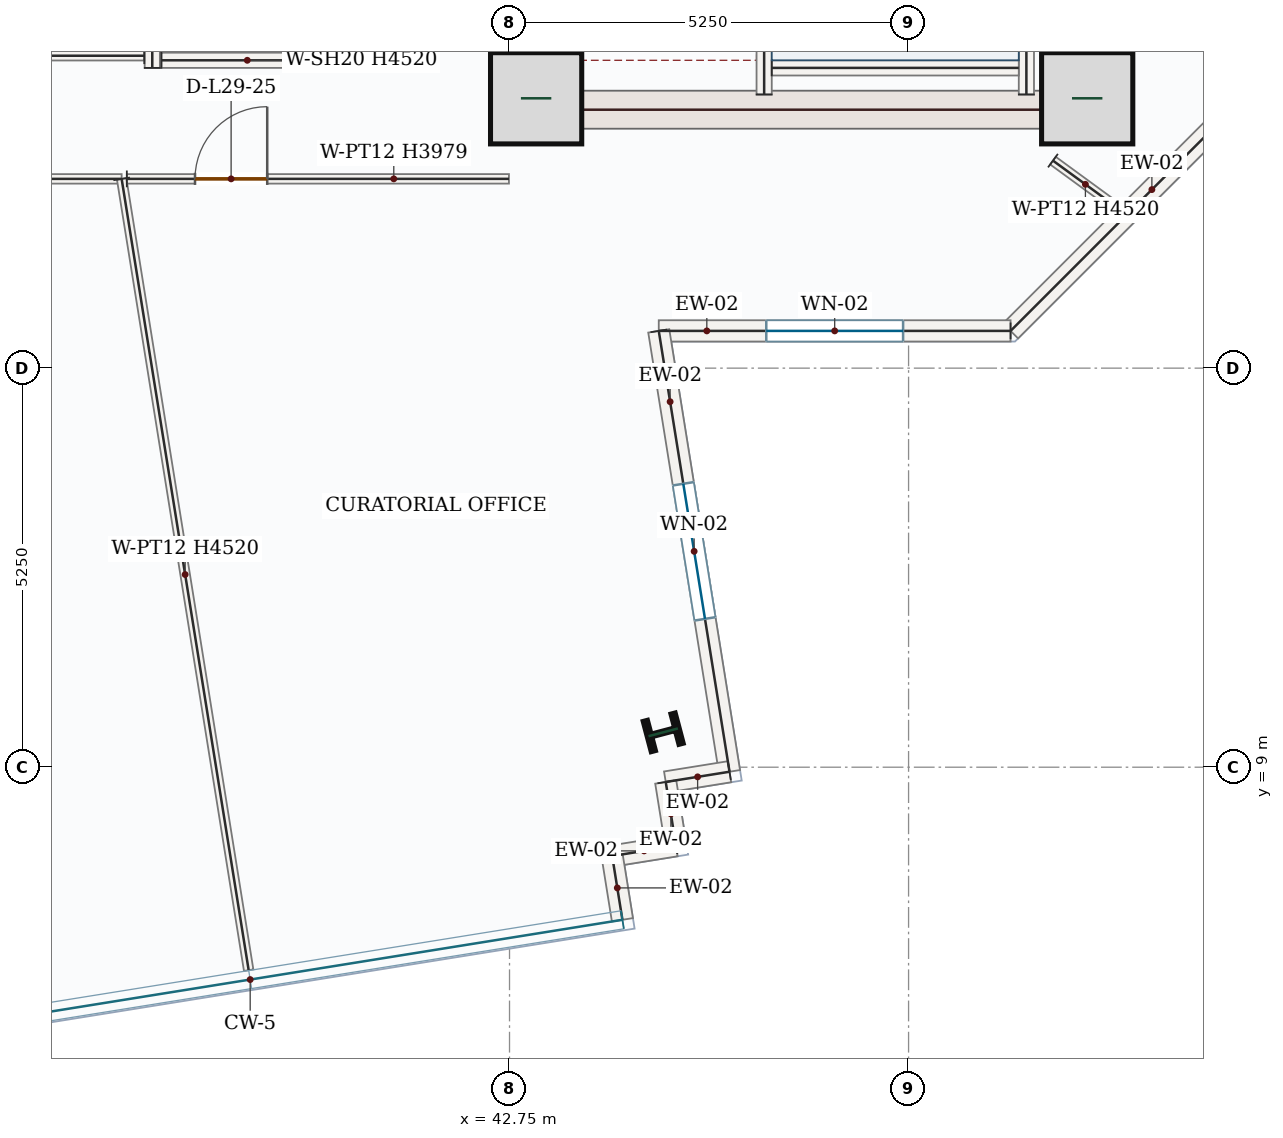
"""IFC4 building model, lengths in metres.
Left out: names, types, materials, properties, quantities, classifications, styles, units other than length and angle.
Written with IfcOpenShell. Run it as: python <this file> out.ifc"""

import sys

from ifc_helpers import new_model, si_unit, direction, frame, frame_2d, origin, origin_2d, place, context, subcontext, project, spatial, rectangle, i_section, extrude, source, transform, mapped, element, fill, save


model = new_model("IFC4")
c1 = context("Model", 3, precision=1e-05, world=origin(), true_north=direction((0.0, 1.0)))
c2 = subcontext(c1, "Body", "Model", "MODEL_VIEW")
j1 = project(units=[si_unit("LENGTHUNIT", "METRE"), si_unit("PLANEANGLEUNIT", "RADIAN")], contexts=[c1])
p1 = place(None, origin())
s1 = spatial("IfcSite", under=j1, at=p1, CompositionType="ELEMENT")
p2 = place(p1, origin())
s2 = spatial("IfcBuilding", under=s1, at=p2, CompositionType="ELEMENT")
p3 = place(p2, frame((0.0, 0.0, 130.8)))
s3 = spatial("IfcBuildingStorey", under=s2, at=p3, CompositionType="ELEMENT", Elevation=130.8)
p4 = place(p3, frame((43.0, 17.4, 0.0), z_axis=(0.0, 0.0, 1.0), x_axis=(0.0, 1.0, 0.0)))
e1 = element("IfcWall", 1, at=p4, inside=s3, PredefinedType="SHEAR", context=c2, shape_type="SweptSolid", body=[
    extrude(rectangle(XDim=8.55, YDim=0.5, at=frame_2d((4.275, 0.0))), origin(), (0.0, 0.0, 1.0), 4.52),
])
p5 = place(p4, frame((6.65, 0.0, 0.0)))
e2 = element("IfcOpeningElement", 2, at=p5, cuts=e1, PredefinedType="OPENING", context=c2, shape_type="SweptSolid", body=[
    extrude(rectangle(XDim=1.1, YDim=2.2, at=frame_2d((0.55, 1.1))), frame((0.0, 0.26, 0.0), z_axis=(0.0, -1.0, 0.0), x_axis=(1.0, 0.0, 0.0)), (0.0, 0.0, 1.0), 0.52),
])
p6 = place(p4, frame((1.75, 0.0, 0.0)))
e3 = element("IfcOpeningElement", 3, at=p6, cuts=e1, PredefinedType="OPENING", context=c2, shape_type="SweptSolid", body=[
    extrude(rectangle(XDim=1.3, YDim=2.2, at=frame_2d((0.65, 1.1))), frame((0.0, 0.26, 0.0), z_axis=(0.0, -1.0, 0.0), x_axis=(1.0, 0.0, 0.0)), (0.0, 0.0, 1.0), 0.52),
])
p7 = place(p4, frame((4.3, 0.0, 0.0)))
e4 = element("IfcOpeningElement", 4, at=p7, cuts=e1, PredefinedType="OPENING", context=c2, shape_type="SweptSolid", body=[
    extrude(rectangle(XDim=0.88, YDim=2.1, at=frame_2d((0.44, 1.05))), frame((0.0, 0.26, 0.0), z_axis=(0.0, -1.0, 0.0), x_axis=(1.0, 0.0, 0.0)), (0.0, 0.0, 1.0), 0.52),
])
m1 = source(origin(), c2, "Body", "SweptSolid", [
    extrude(rectangle(XDim=8.55, YDim=0.5, at=frame_2d((4.275, 0.0))), origin(), (0.0, 0.0, 1.0), 4.52),
])
p8 = place(p3, frame((50.5, 17.4, 0.0), z_axis=(0.0, 0.0, 1.0), x_axis=(0.0, 1.0, 0.0)))
e5 = element("IfcWall", 5, at=p8, inside=s3, PredefinedType="SHEAR", context=c2, shape_type="MappedRepresentation", body=[
    mapped(m1, transform((0.0, 0.0, 0.0), x_axis=(1.0, 0.0, 0.0), y_axis=(0.0, 1.0, 0.0), z_axis=(0.0, 0.0, 1.0), scale=1.0)),
])
m2 = source(origin(), c2, "Body", "SweptSolid", [
    extrude(rectangle(XDim=7.0, YDim=0.5, at=frame_2d((3.5, 0.0))), origin(), (0.0, 0.0, 1.0), 4.52),
])
p9 = place(p3, frame((43.25, 17.65, 0.0), z_axis=(0.0, 0.0, 1.0), x_axis=(1.0, 0.0, 0.0)))
e6 = element("IfcWall", 6, at=p9, inside=s3, PredefinedType="SHEAR", context=c2, shape_type="MappedRepresentation", body=[
    mapped(m2, transform((0.0, 0.0, 0.0), x_axis=(1.0, 0.0, 0.0), y_axis=(0.0, 1.0, 0.0), z_axis=(0.0, 0.0, 1.0), scale=1.0)),
])
m3 = source(origin(), c2, "Body", "SweptSolid", [
    extrude(rectangle(XDim=1.2, YDim=1.2, at=origin_2d()), origin(), (0.0, 0.0, 1.0), 4.8),
])
for number, where, z_axis, x_axis in (
    (7, (43.1, 17.8, 0.0), (0.0, 0.0, 1.0), (1.0, 0.0, 0.0)),
    (8, (50.35, 17.8, 0.0), (0.0, 0.0, 1.0), (1.0, 0.0, 0.0)),
):
    element("IfcColumn", number, at=place(p3, frame(where, z_axis=z_axis, x_axis=x_axis)), inside=s3, PredefinedType="COLUMN", context=c2, shape_type="MappedRepresentation", body=[
        mapped(m3, transform((0.0, 0.0, 0.0), x_axis=(1.0, 0.0, 0.0), y_axis=(0.0, 1.0, 0.0), z_axis=(0.0, 0.0, 1.0), scale=1.0)),
    ])
m4 = source(origin(), c2, "Body", "SweptSolid", [
    extrude(i_section(OverallWidth=0.412, OverallDepth=0.435, WebThickness=0.036, FlangeThickness=0.057, FilletRadius=0.018, at=origin_2d()), origin(), (0.0, 0.0, 1.0), 4.8),
])
p10 = place(p3, frame((44.772, 9.459, 0.0), z_axis=(0.0, 0.0, 1.0), x_axis=(-0.255445757936, 0.966823388604, 0.0)))
e9 = element("IfcColumn", 9, at=p10, inside=s3, PredefinedType="COLUMN", context=c2, shape_type="MappedRepresentation", body=[
    mapped(m4, transform((0.0, 0.0, 0.0), x_axis=(1.0, 0.0, 0.0), y_axis=(0.0, 1.0, 0.0), z_axis=(0.0, 0.0, 1.0), scale=1.0)),
])
m5 = source(origin(), c2, "Body", "SweptSolid", [
    extrude(rectangle(XDim=5.258, YDim=0.28, at=frame_2d((2.629, 0.0))), origin(), (0.0, 0.0, 1.0), 4.52),
])
p11 = place(p3, frame((53.06, 18.458, 0.0), z_axis=(0.0, 0.0, 1.0), x_axis=(-0.707106781187, -0.707106781187, 0.0)))
e10 = element("IfcWall", 10, at=p11, inside=s3, PredefinedType="SOLIDWALL", context=c2, shape_type="MappedRepresentation", body=[
    mapped(m5, transform((0.0, 0.0, 0.0), x_axis=(1.0, 0.0, 0.0), y_axis=(0.0, 1.0, 0.0), z_axis=(0.0, 0.0, 1.0), scale=1.0)),
])
p12 = place(p3, frame((49.342, 14.74, 0.0), z_axis=(0.0, 0.0, 1.0), x_axis=(-1.0, 0.0, 0.0)))
e11 = element("IfcWall", 11, at=p12, inside=s3, PredefinedType="SOLIDWALL", context=c2, shape_type="SweptSolid", body=[
    extrude(rectangle(XDim=4.629, YDim=0.28, at=frame_2d((2.314, 0.0))), origin(), (0.0, 0.0, 1.0), 4.52),
])
p13 = place(p12, frame((1.414, 0.0, 0.85)))
e12 = element("IfcOpeningElement", 12, at=p13, cuts=e11, PredefinedType="OPENING", context=c2, shape_type="SweptSolid", body=[
    extrude(rectangle(XDim=1.8, YDim=1.75, at=frame_2d((0.9, 0.875))), frame((0.0, 0.15, 0.0), z_axis=(0.0, -1.0, 0.0), x_axis=(1.0, 0.0, 0.0)), (0.0, 0.0, 1.0), 0.3),
])
p14 = place(p3, frame((44.713, 14.74, 0.0), z_axis=(0.0, 0.0, 1.0), x_axis=(0.158478405349, -0.987362443603, 0.0)))
e13 = element("IfcWall", 13, at=p14, inside=s3, PredefinedType="SOLIDWALL", context=c2, shape_type="SweptSolid", body=[
    extrude(rectangle(XDim=5.874, YDim=0.28, at=frame_2d((2.937, 0.0))), origin(), (0.0, 0.0, 1.0), 4.52),
])
p15 = place(p14, frame((2.037, 0.0, 0.85)))
e14 = element("IfcOpeningElement", 14, at=p15, cuts=e13, PredefinedType="OPENING", context=c2, shape_type="SweptSolid", body=[
    extrude(rectangle(XDim=1.8, YDim=1.75, at=frame_2d((0.9, 0.875))), frame((0.0, 0.15, 0.0), z_axis=(0.0, -1.0, 0.0), x_axis=(1.0, 0.0, 0.0)), (0.0, 0.0, 1.0), 0.3),
])
m6 = source(origin(), c2, "Body", "SweptSolid", [
    extrude(rectangle(XDim=0.85, YDim=0.28, at=frame_2d((0.425, 0.0))), origin(), (0.0, 0.0, 1.0), 4.52),
])
p16 = place(p3, frame((45.644, 8.94, 0.0), z_axis=(0.0, 0.0, 1.0), x_axis=(-0.987392182174, -0.158293014948, 0.0)))
e15 = element("IfcWall", 15, at=p16, inside=s3, PredefinedType="SOLIDWALL", context=c2, shape_type="MappedRepresentation", body=[
    mapped(m6, transform((0.0, 0.0, 0.0), x_axis=(1.0, 0.0, 0.0), y_axis=(0.0, 1.0, 0.0), z_axis=(0.0, 0.0, 1.0), scale=1.0)),
])
m7 = source(origin(), c2, "Body", "SweptSolid", [
    extrude(rectangle(XDim=0.85, YDim=0.28, at=frame_2d((0.425, 0.0))), origin(), (0.0, 0.0, 1.0), 4.52),
])
for number, where, z_axis, x_axis in (
    (16, (44.805, 8.806, 0.0), (0.0, 0.0, 1.0), (0.159, -0.987, 0.0)),
    (17, (44.94, 7.966, 0.0), (0.0, 0.0, 1.0), (-0.987, -0.159, 0.0)),
):
    element("IfcWall", number, at=place(p3, frame(where, z_axis=z_axis, x_axis=x_axis)), inside=s3, PredefinedType="SOLIDWALL", context=c2, shape_type="MappedRepresentation", body=[
        mapped(m7, transform((0.0, 0.0, 0.0), x_axis=(1.0, 0.0, 0.0), y_axis=(0.0, 1.0, 0.0), z_axis=(0.0, 0.0, 1.0), scale=1.0)),
    ])
p17 = place(p3, frame((44.101, 7.832, 0.0), z_axis=(0.0, 0.0, 1.0), x_axis=(0.15857308062, -0.98734724292, 0.0)))
e18 = element("IfcWall", 18, at=p17, inside=s3, PredefinedType="SOLIDWALL", context=c2, shape_type="MappedRepresentation", body=[
    mapped(m6, transform((0.0, 0.0, 0.0), x_axis=(1.0, 0.0, 0.0), y_axis=(0.0, 1.0, 0.0), z_axis=(0.0, 0.0, 1.0), scale=1.0)),
])
m8 = source(origin(), c2, "Body", "SweptSolid", [
    extrude(rectangle(XDim=7.87, YDim=0.2, at=frame_2d((3.935, 0.0))), origin(), (0.0, 0.0, 1.0), 4.52),
])
p18 = place(p3, frame((49.55, 17.85, 0.0), z_axis=(0.0, 0.0, 1.0), x_axis=(0.0, 1.0, 0.0)))
e19 = element("IfcWall", 19, at=p18, inside=s3, PredefinedType="SOLIDWALL", context=c2, shape_type="MappedRepresentation", body=[
    mapped(m8, transform((0.0, 0.0, 0.0), x_axis=(1.0, 0.0, 0.0), y_axis=(0.0, 1.0, 0.0), z_axis=(0.0, 0.0, 1.0), scale=1.0)),
])
p19 = place(p3, frame((46.1, 17.85, 0.0), z_axis=(0.0, 0.0, 1.0), x_axis=(0.0, 1.0, 0.0)))
e20 = element("IfcWall", 20, at=p19, inside=s3, PredefinedType="SOLIDWALL", context=c2, shape_type="SweptSolid", body=[
    extrude(rectangle(XDim=8.0, YDim=0.2, at=frame_2d((4.0, 0.0))), origin(), (0.0, 0.0, 1.0), 4.52),
])
p20 = place(p19, frame((6.3, 0.0, 0.0)))
e21 = element("IfcOpeningElement", 21, at=p20, cuts=e20, PredefinedType="OPENING", context=c2, shape_type="SweptSolid", body=[
    extrude(rectangle(XDim=1.05, YDim=2.15, at=frame_2d((0.525, 1.075))), frame((0.0, 0.11, 0.0), z_axis=(0.0, -1.0, 0.0), x_axis=(1.0, 0.0, 0.0)), (0.0, 0.0, 1.0), 0.22),
])
m9 = source(origin(), c2, "Body", "SweptSolid", [
    extrude(rectangle(XDim=3.25, YDim=0.2, at=frame_2d((1.625, 0.0))), origin(), (0.0, 0.0, 1.0), 4.52),
])
p21 = place(p3, frame((46.2, 18.2, 0.0), z_axis=(0.0, 0.0, 1.0), x_axis=(1.0, 0.0, 0.0)))
e22 = element("IfcWall", 22, at=p21, inside=s3, PredefinedType="SOLIDWALL", context=c2, shape_type="MappedRepresentation", body=[
    mapped(m9, transform((0.0, 0.0, 0.0), x_axis=(1.0, 0.0, 0.0), y_axis=(0.0, 1.0, 0.0), z_axis=(0.0, 0.0, 1.0), scale=1.0)),
])
m10 = source(origin(), c2, "Body", "SweptSolid", [
    extrude(rectangle(XDim=2.35, YDim=0.2, at=frame_2d((1.175, 0.0))), origin(), (0.0, 0.0, 1.0), 4.52),
])
p22 = place(p3, frame((38.05, 18.2, 0.0), z_axis=(0.0, 0.0, 1.0), x_axis=(0.0, 1.0, 0.0)))
e23 = element("IfcWall", 23, at=p22, inside=s3, PredefinedType="SOLIDWALL", context=c2, shape_type="MappedRepresentation", body=[
    mapped(m10, transform((0.0, 0.0, 0.0), x_axis=(1.0, 0.0, 0.0), y_axis=(0.0, 1.0, 0.0), z_axis=(0.0, 0.0, 1.0), scale=1.0)),
])
p23 = place(p3, frame((40.55, 18.2, 0.0), z_axis=(0.0, 0.0, 1.0), x_axis=(0.0, 1.0, 0.0)))
e24 = element("IfcWall", 24, at=p23, inside=s3, PredefinedType="SOLIDWALL", context=c2, shape_type="SweptSolid", body=[
    extrude(rectangle(XDim=2.35, YDim=0.2, at=frame_2d((1.175, 0.0))), origin(), (0.0, 0.0, 1.0), 4.52),
])
p24 = place(p23, frame((0.625, 0.0, 0.0)))
e25 = element("IfcOpeningElement", 25, at=p24, cuts=e24, PredefinedType="OPENING", context=c2, shape_type="SweptSolid", body=[
    extrude(rectangle(XDim=1.1, YDim=2.15, at=frame_2d((0.55, 1.075))), frame((0.0, 0.11, 0.0), z_axis=(0.0, -1.0, 0.0), x_axis=(1.0, 0.0, 0.0)), (0.0, 0.0, 1.0), 0.22),
])
m11 = source(origin(), c2, "Body", "SweptSolid", [
    extrude(rectangle(XDim=2.26, YDim=0.2, at=frame_2d((1.13, 0.0))), origin(), (0.0, 0.0, 1.0), 4.52),
])
p25 = place(p3, frame((38.17, 18.3, 0.0), z_axis=(0.0, 0.0, 1.0), x_axis=(1.0, 0.0, 0.0)))
e26 = element("IfcWall", 26, at=p25, inside=s3, PredefinedType="SOLIDWALL", context=c2, shape_type="MappedRepresentation", body=[
    mapped(m11, transform((0.0, 0.0, 0.0), x_axis=(1.0, 0.0, 0.0), y_axis=(0.0, 1.0, 0.0), z_axis=(0.0, 0.0, 1.0), scale=1.0)),
])
m12 = source(origin(), c2, "Body", "SweptSolid", [
    extrude(rectangle(XDim=3.89, YDim=0.125, at=frame_2d((1.945, 0.0))), origin(), (0.0, 0.0, 1.0), 4.52),
])
p26 = place(p3, frame((37.945, 18.36, 0.0), z_axis=(0.0, 0.0, 1.0), x_axis=(-1.0, 0.0, 0.0)))
e27 = element("IfcWall", 27, at=p26, inside=s3, PredefinedType="PARTITIONING", context=c2, shape_type="MappedRepresentation", body=[
    mapped(m12, transform((0.0, 0.0, 0.0), x_axis=(1.0, 0.0, 0.0), y_axis=(0.0, 1.0, 0.0), z_axis=(0.0, 0.0, 1.0), scale=1.0)),
])
p27 = place(p3, frame((29.258, 16.74, 0.0), z_axis=(0.0, 0.0, 1.0), x_axis=(0.999999999577, -2.9101068e-05, 0.0)))
e28 = element("IfcWall", 28, at=p27, inside=s3, PredefinedType="PARTITIONING", context=c2, shape_type="SweptSolid", body=[
    extrude(rectangle(XDim=8.389, YDim=0.125, at=frame_2d((4.195, 0.0))), origin(), (0.0, 0.0, 1.0), 4.52),
])
p28 = place(p27, frame((5.803, 0.0, 0.0)))
e29 = element("IfcOpeningElement", 29, at=p28, cuts=e28, PredefinedType="OPENING", context=c2, shape_type="SweptSolid", body=[
    extrude(rectangle(XDim=0.95, YDim=2.15, at=frame_2d((0.475, 1.075))), frame((0.0, 0.073, 0.0), z_axis=(0.0, -1.0, 0.0), x_axis=(1.0, 0.0, 0.0)), (0.0, 0.0, 1.0), 0.145),
])
m13 = source(origin(), c2, "Body", "SweptSolid", [
    extrude(rectangle(XDim=10.544, YDim=0.125, at=frame_2d((5.272, 0.0))), origin(), (0.0, 0.0, 1.0), 4.52),
])
p29 = place(p3, frame((37.647, 16.74, 0.0), z_axis=(0.0, 0.0, 1.0), x_axis=(0.158497112457, -0.987359440803, 0.0)))
e30 = element("IfcWall", 30, at=p29, inside=s3, PredefinedType="PARTITIONING", context=c2, shape_type="MappedRepresentation", body=[
    mapped(m13, transform((0.0, 0.0, 0.0), x_axis=(1.0, 0.0, 0.0), y_axis=(0.0, 1.0, 0.0), z_axis=(0.0, 0.0, 1.0), scale=1.0)),
])
p30 = place(p3, frame((37.715, 16.74, 0.0), z_axis=(0.0, 0.0, 1.0), x_axis=(0.999999998821, 4.8564907e-05, 0.0)))
e31 = element("IfcWall", 31, at=p30, inside=s3, PredefinedType="PARTITIONING", context=c2, shape_type="SweptSolid", body=[
    extrude(rectangle(XDim=5.027, YDim=0.125, at=frame_2d((2.514, 0.0))), origin(), (0.0, 0.0, 1.0), 3.979),
])
p31 = place(p30, frame((0.897, 0.0, 0.0)))
e32 = element("IfcOpeningElement", 32, at=p31, cuts=e31, PredefinedType="OPENING", context=c2, shape_type="SweptSolid", body=[
    extrude(rectangle(XDim=0.95, YDim=2.15, at=frame_2d((0.475, 1.075))), frame((0.0, 0.073, 0.0), z_axis=(0.0, -1.0, 0.0), x_axis=(1.0, 0.0, 0.0)), (0.0, 0.0, 1.0), 0.145),
])
m14 = source(origin(), c2, "Body", "SweptSolid", [
    extrude(rectangle(XDim=1.057, YDim=0.125, at=frame_2d((0.529, 0.0))), origin(), (0.0, 0.0, 1.0), 4.52),
])
p32 = place(p3, frame((49.9, 16.98, 0.0), z_axis=(0.0, 0.0, 1.0), x_axis=(0.80755610306, -0.589790759855, 0.0)))
e33 = element("IfcWall", 33, at=p32, inside=s3, PredefinedType="PARTITIONING", context=c2, shape_type="MappedRepresentation", body=[
    mapped(m14, transform((0.0, 0.0, 0.0), x_axis=(1.0, 0.0, 0.0), y_axis=(0.0, 1.0, 0.0), z_axis=(0.0, 0.0, 1.0), scale=1.0)),
])
m15 = source(origin(), c2, "Body", "SweptSolid", [
    extrude(rectangle(XDim=1.8, YDim=1.75, at=frame_2d((0.9, 0.875))), frame((0.0, 0.03, 0.0), z_axis=(0.0, -1.0, 0.0), x_axis=(1.0, 0.0, 0.0)), (0.0, 0.0, 1.0), 0.06),
])
p33 = place(p13, origin())
e34 = element("IfcWindow", 34, at=p33, inside=s3, PartitioningType="DOUBLE_PANEL_VERTICAL", PredefinedType="WINDOW", context=c2, shape_type="MappedRepresentation", body=[
    mapped(m15, transform((0.0, 0.0, 0.0), x_axis=(1.0, 0.0, 0.0), y_axis=(0.0, 1.0, 0.0), z_axis=(0.0, 0.0, 1.0), scale=1.0)),
])
fill(e12, e34)
p34 = place(p15, origin())
e35 = element("IfcWindow", 35, at=p34, inside=s3, PartitioningType="DOUBLE_PANEL_VERTICAL", PredefinedType="WINDOW", context=c2, shape_type="MappedRepresentation", body=[
    mapped(m15, transform((0.0, 0.0, 0.0), x_axis=(1.0, 0.0, 0.0), y_axis=(0.0, 1.0, 0.0), z_axis=(0.0, 0.0, 1.0), scale=1.0)),
])
fill(e14, e35)
m16 = source(origin(), c2, "Body", "SweptSolid", [
    extrude(rectangle(XDim=0.95, YDim=2.15, at=frame_2d((0.475, 1.075))), frame((0.0, 0.025, 0.0), z_axis=(0.0, -1.0, 0.0), x_axis=(1.0, 0.0, 0.0)), (0.0, 0.0, 1.0), 0.05),
])
p35 = place(p31, origin())
e36 = element("IfcDoor", 36, at=p35, inside=s3, OperationType="SINGLE_SWING_RIGHT", PredefinedType="DOOR", context=c2, shape_type="MappedRepresentation", body=[
    mapped(m16, transform((0.0, 0.0, 0.0), x_axis=(1.0, 0.0, 0.0), y_axis=(0.0, 1.0, 0.0), z_axis=(0.0, 0.0, 1.0), scale=1.0)),
])
fill(e32, e36)
save(model, sys.argv[1])
